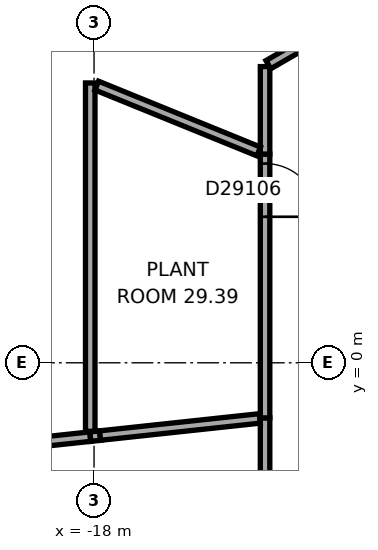
"""IFC4 building model, lengths in metres.
Left out: names, types, materials, properties, quantities, classifications, styles, units other than length and angle.
Written with IfcOpenShell. Run it as: python <this file> out.ifc"""

import sys

from ifc_helpers import new_model, si_unit, direction, frame, frame_2d, origin, place, context, subcontext, project, spatial, rectangle, extrude, element, fill, save


model = new_model("IFC4")
c1 = context("Model", 3, precision=1e-05, world=origin(), true_north=direction((0.0, 1.0)))
c2 = subcontext(c1, "Body", "Model", "MODEL_VIEW")
j1 = project(units=[si_unit("LENGTHUNIT", "METRE"), si_unit("PLANEANGLEUNIT", "RADIAN")], contexts=[c1])
p1 = place(None, origin())
s1 = spatial("IfcSite", under=j1, at=p1, CompositionType="ELEMENT")
p2 = place(p1, origin())
s2 = spatial("IfcBuilding", under=s1, at=p2, CompositionType="ELEMENT")
p3 = place(p2, frame((0.0, 0.0, 119.9)))
s3 = spatial("IfcBuildingStorey", under=s2, at=p3, CompositionType="ELEMENT", Elevation=119.9)
p4 = place(p3, frame((-13.5, -7.794, 0.0), z_axis=(0.0, 0.0, 1.0), x_axis=(0.0, 1.0, 0.0)))
e1 = element("IfcWall", 1, at=p4, inside=s3, PredefinedType="SOLIDWALL", context=c2, shape_type="SweptSolid", body=[
    extrude(rectangle(XDim=6.345, YDim=0.25, at=frame_2d((3.172, 0.0))), origin(), (0.0, 0.0, 1.0), 4.22),
])
p5 = place(p4, frame((0.6, 0.0, 0.0)))
e2 = element("IfcOpeningElement", 2, at=p5, cuts=e1, PredefinedType="OPENING", context=c2, shape_type="SweptSolid", body=[
    extrude(rectangle(XDim=1.4, YDim=2.1, at=frame_2d((0.7, 1.05))), frame((0.0, 0.135, 0.0), z_axis=(0.0, -1.0, 0.0), x_axis=(1.0, 0.0, 0.0)), (0.0, 0.0, 1.0), 0.27),
])
p6 = place(p3, frame((-21.161, -2.271, 0.0), z_axis=(0.0, 0.0, 1.0), x_axis=(0.99429444282, 0.106670337847, 0.0)))
e3 = element("IfcWall", 3, at=p6, inside=s3, PredefinedType="SOLIDWALL", context=c2, shape_type="SweptSolid", body=[
    extrude(rectangle(XDim=3.078, YDim=0.25, at=frame_2d((1.539, 0.0))), origin(), (0.0, 0.0, 1.0), 3.2),
])
p7 = place(p3, frame((-17.842, -1.915, 0.0), z_axis=(0.0, 0.0, 1.0), x_axis=(-0.994157722511, -0.107937124158, 0.0)))
e4 = element("IfcWall", 4, at=p7, inside=s3, PredefinedType="SOLIDWALL", context=c2, shape_type="SweptSolid", body=[
    extrude(rectangle(XDim=0.258, YDim=0.25, at=frame_2d((0.129, 0.0))), origin(), (0.0, 0.0, 1.0), 4.22),
])
p8 = place(p3, frame((-17.842, -1.915, 0.0), z_axis=(0.0, 0.0, 1.0), x_axis=(0.994286185639, 0.106747276539, 0.0)))
e5 = element("IfcWall", 5, at=p8, inside=s3, PredefinedType="SOLIDWALL", context=c2, shape_type="SweptSolid", body=[
    extrude(rectangle(XDim=4.227, YDim=0.25, at=frame_2d((2.113, 0.0))), origin(), (0.0, 0.0, 1.0), 3.2),
])
p9 = place(p3, frame((-18.1, -1.803, 0.0), z_axis=(0.0, 0.0, 1.0), x_axis=(0.0, 1.0, 0.0)))
e6 = element("IfcWall", 6, at=p9, inside=s3, PredefinedType="SOLIDWALL", context=c2, shape_type="SweptSolid", body=[
    extrude(rectangle(XDim=9.166, YDim=0.25, at=frame_2d((4.583, 0.0))), origin(), (0.0, 0.0, 1.0), 4.22),
])
p10 = place(p3, frame((-13.5, -1.449, 0.0), z_axis=(0.0, 0.0, 1.0), x_axis=(0.0, 1.0, 0.0)))
e7 = element("IfcWall", 7, at=p10, inside=s3, PredefinedType="SOLIDWALL", context=c2, shape_type="SweptSolid", body=[
    extrude(rectangle(XDim=6.941, YDim=0.25, at=frame_2d((3.47, 0.0))), origin(), (0.0, 0.0, 1.0), 4.22),
])
p11 = place(p10, frame((5.291, 0.0, 0.0)))
e8 = element("IfcOpeningElement", 8, at=p11, cuts=e7, PredefinedType="OPENING", context=c2, shape_type="SweptSolid", body=[
    extrude(rectangle(XDim=1.4, YDim=2.1, at=frame_2d((0.7, 1.05))), frame((0.0, 0.135, 0.0), z_axis=(0.0, -1.0, 0.0), x_axis=(1.0, 0.0, 0.0)), (0.0, 0.0, 1.0), 0.27),
])
p12 = place(p3, frame((-13.5, 5.492, 0.0), z_axis=(0.0, 0.0, 1.0), x_axis=(0.0, 1.0, 0.0)))
e9 = element("IfcWall", 9, at=p12, inside=s3, PredefinedType="SOLIDWALL", context=c2, shape_type="SweptSolid", body=[
    extrude(rectangle(XDim=2.302, YDim=0.25, at=frame_2d((1.151, 0.0))), origin(), (0.0, 0.0, 1.0), 4.22),
])
p13 = place(p3, frame((-17.929, 7.294, 0.0), z_axis=(0.0, 0.0, 1.0), x_axis=(0.926302305382, -0.376781155373, 0.0)))
e10 = element("IfcWall", 10, at=p13, inside=s3, PredefinedType="SOLIDWALL", context=c2, shape_type="SweptSolid", body=[
    extrude(rectangle(XDim=4.602, YDim=0.25, at=frame_2d((2.301, 0.0))), origin(), (0.0, 0.0, 1.0), 3.2),
])
p14 = place(p3, frame((-8.262, 10.818, 0.0), z_axis=(0.0, 0.0, 1.0), x_axis=(-0.866006491466, -0.500032755666, 0.0)))
e11 = element("IfcWall", 11, at=p14, inside=s3, PredefinedType="SOLIDWALL", context=c2, shape_type="SweptSolid", body=[
    extrude(rectangle(XDim=5.948, YDim=0.25, at=frame_2d((2.974, 0.0))), origin(), (0.0, 0.0, 1.0), 4.22),
])
p15 = place(p14, frame((0.65, 0.0, 0.0)))
e12 = element("IfcOpeningElement", 12, at=p15, cuts=e11, PredefinedType="OPENING", context=c2, shape_type="SweptSolid", body=[
    extrude(rectangle(XDim=1.4, YDim=2.1, at=frame_2d((0.7, 1.05))), frame((0.0, 0.135, 0.0), z_axis=(0.0, -1.0, 0.0), x_axis=(1.0, 0.0, 0.0)), (0.0, 0.0, 1.0), 0.27),
])
p16 = place(p11, origin())
e13 = element("IfcDoor", 13, at=p16, inside=s3, OperationType="SINGLE_SWING_LEFT", PredefinedType="DOOR", context=c2, shape_type="SweptSolid", body=[
    extrude(rectangle(XDim=1.4, YDim=2.1, at=frame_2d((0.7, 1.05))), frame((0.0, 0.025, 0.0), z_axis=(0.0, -1.0, 0.0), x_axis=(1.0, 0.0, 0.0)), (0.0, 0.0, 1.0), 0.05),
])
fill(e8, e13)
save(model, sys.argv[1])
